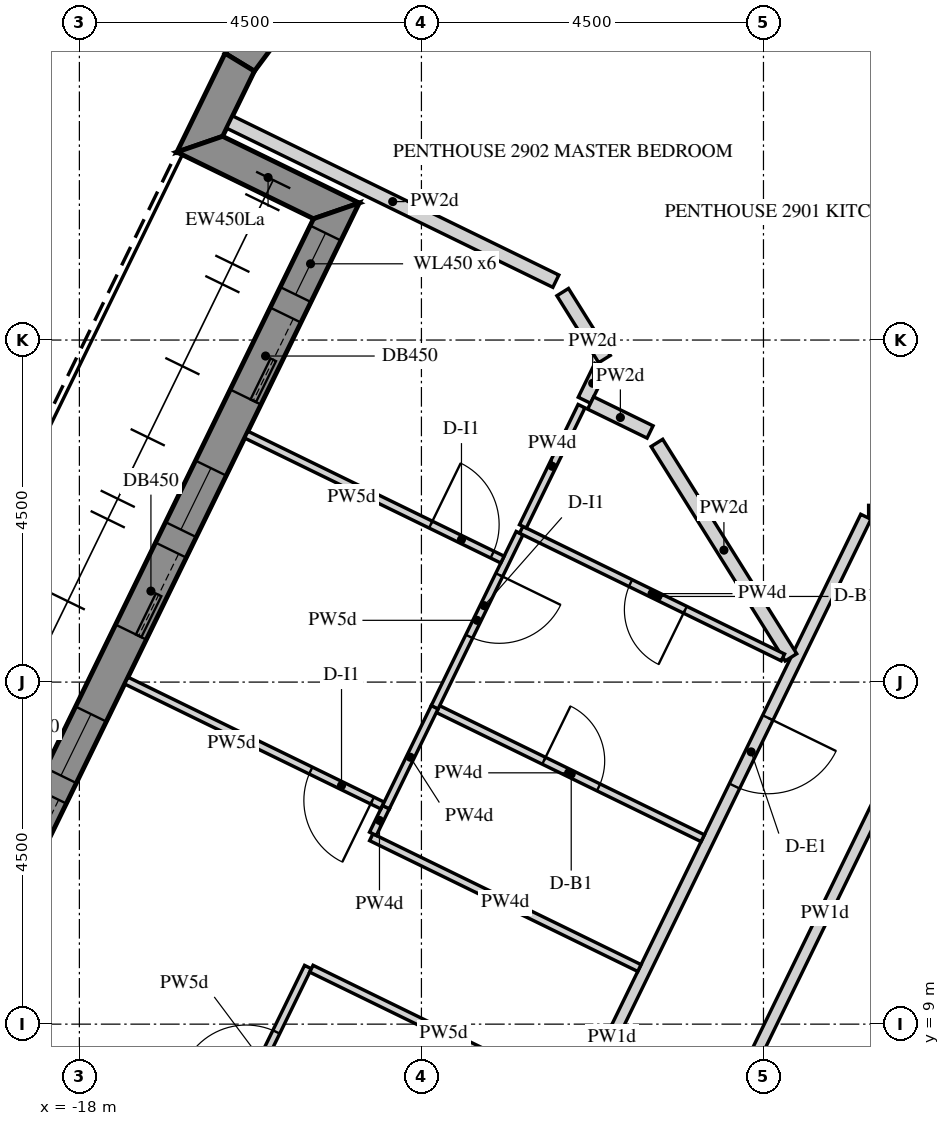
"""IFC4 building model, lengths in metres.
Left out: names, types, materials, properties, quantities, classifications, styles, units other than length and angle.
Written with IfcOpenShell. Run it as: python <this file> out.ifc"""

import sys

from ifc_helpers import new_model, si_unit, direction, frame, frame_2d, origin, place, context, subcontext, project, spatial, polyline, rectangle, outline, extrude, element, fill, save


model = new_model("IFC4")
c1 = context("Model", 3, precision=1e-05, world=origin(), true_north=direction((0.0, 1.0)))
c2 = subcontext(c1, "Body", "Model", "MODEL_VIEW")
j1 = project(units=[si_unit("LENGTHUNIT", "METRE"), si_unit("PLANEANGLEUNIT", "RADIAN")], contexts=[c1])
p1 = place(None, origin())
s1 = spatial("IfcSite", under=j1, at=p1, CompositionType="ELEMENT")
p2 = place(p1, origin())
s2 = spatial("IfcBuilding", under=s1, at=p2, CompositionType="ELEMENT")
p3 = place(p2, frame((0.0, 0.0, 372.9)))
s3 = spatial("IfcBuildingStorey", under=s2, at=p3, CompositionType="ELEMENT", Elevation=372.9)
p4 = place(p3, frame((-15.056, 22.776, -0.15), z_axis=(0.0, 0.0, 1.0), x_axis=(-0.597089203515, -0.802174845682, 0.0)))
e1 = element("IfcWall", 1, at=p4, inside=s3, PredefinedType="SOLIDWALL", context=c2, shape_type="SweptSolid", body=[
    extrude(outline(polyline([(-0.042, -0.225), (1.418, -0.225), (1.376, 0.225), (0.042, 0.225), (-0.042, -0.225)])), origin(), (0.0, 0.0, 1.0), 3.55),
])
p5 = place(p3, frame((-15.89, 21.655, -0.15), z_axis=(0.0, 0.0, 1.0), x_axis=(-0.438319390103, -0.898819287877, 0.0)))
e2 = element("IfcWall", 2, at=p5, inside=s3, PredefinedType="SOLIDWALL", context=c2, shape_type="SweptSolid", body=[
    extrude(outline(polyline([(-0.021, -0.225), (1.425, -0.225), (0.975, 0.225), (0.021, 0.225), (-0.021, -0.225)])), origin(), (0.0, 0.0, 1.0), 3.55),
])
p6 = place(p3, frame((-16.416, 20.576, -0.15), z_axis=(0.0, 0.0, 1.0), x_axis=(0.898730898244, -0.438500595829, 0.0)))
e3 = element("IfcWall", 3, at=p6, inside=s3, PredefinedType="SOLIDWALL", context=c2, shape_type="SweptSolid", body=[
    extrude(outline(polyline([(-0.225, -0.225), (1.775, -0.225), (2.225, 0.225), (0.225, 0.225), (-0.225, -0.225)])), origin(), (0.0, 0.0, 1.0), 3.55),
])
p7 = place(p3, frame((-14.619, 19.699, -0.15), z_axis=(0.0, 0.0, 1.0), x_axis=(-0.438373747484, -0.898792777851, 0.0)))
e4 = element("IfcWall", 4, at=p7, inside=s3, PredefinedType="SOLIDWALL", context=c2, shape_type="SweptSolid", body=[
    extrude(outline(polyline([(0.225, -0.225), (20.506, -0.225), (20.957, 0.225), (-0.225, 0.225), (0.225, -0.225)])), origin(), (0.0, 0.0, 1.0), 3.55),
])
p8 = place(p7, frame((0.325, 0.0, 1.05)))
e5 = element("IfcOpeningElement", 5, at=p8, cuts=e4, PredefinedType="OPENING", context=c2, shape_type="SweptSolid", body=[
    extrude(rectangle(XDim=0.9, YDim=1.5, at=frame_2d((0.45, 0.75))), frame((0.0, 0.235, 0.0), z_axis=(0.0, -1.0, 0.0), x_axis=(1.0, 0.0, 0.0)), (0.0, 0.0, 1.0), 0.47),
])
p9 = place(p7, frame((1.525, 0.0, 0.15)))
e6 = element("IfcOpeningElement", 6, at=p9, cuts=e4, PredefinedType="OPENING", context=c2, shape_type="SweptSolid", body=[
    extrude(rectangle(XDim=1.2, YDim=2.4, at=frame_2d((0.6, 1.2))), frame((0.0, 0.235, 0.0), z_axis=(0.0, -1.0, 0.0), x_axis=(1.0, 0.0, 0.0)), (0.0, 0.0, 1.0), 0.47),
])
p10 = place(p7, frame((3.766, 0.0, 1.05)))
e7 = element("IfcOpeningElement", 7, at=p10, cuts=e4, PredefinedType="OPENING", context=c2, shape_type="SweptSolid", body=[
    extrude(rectangle(XDim=0.9, YDim=1.5, at=frame_2d((0.45, 0.75))), frame((0.0, 0.235, 0.0), z_axis=(0.0, -1.0, 0.0), x_axis=(1.0, 0.0, 0.0)), (0.0, 0.0, 1.0), 0.47),
])
p11 = place(p7, frame((4.966, 0.0, 0.15)))
e8 = element("IfcOpeningElement", 8, at=p11, cuts=e4, PredefinedType="OPENING", context=c2, shape_type="SweptSolid", body=[
    extrude(rectangle(XDim=1.2, YDim=2.4, at=frame_2d((0.6, 1.2))), frame((0.0, 0.235, 0.0), z_axis=(0.0, -1.0, 0.0), x_axis=(1.0, 0.0, 0.0)), (0.0, 0.0, 1.0), 0.47),
])
p12 = place(p7, frame((7.366, 0.0, 1.05)))
e9 = element("IfcOpeningElement", 9, at=p12, cuts=e4, PredefinedType="OPENING", context=c2, shape_type="SweptSolid", body=[
    extrude(rectangle(XDim=0.9, YDim=1.5, at=frame_2d((0.45, 0.75))), frame((0.0, 0.235, 0.0), z_axis=(0.0, -1.0, 0.0), x_axis=(1.0, 0.0, 0.0)), (0.0, 0.0, 1.0), 0.47),
])
p13 = place(p7, frame((8.566, 0.0, 0.15)))
e10 = element("IfcOpeningElement", 10, at=p13, cuts=e4, PredefinedType="OPENING", context=c2, shape_type="SweptSolid", body=[
    extrude(rectangle(XDim=1.2, YDim=2.4, at=frame_2d((0.6, 1.2))), frame((0.0, 0.235, 0.0), z_axis=(0.0, -1.0, 0.0), x_axis=(1.0, 0.0, 0.0)), (0.0, 0.0, 1.0), 0.47),
])
p14 = place(p7, frame((10.966, 0.0, 1.05)))
e11 = element("IfcOpeningElement", 11, at=p14, cuts=e4, PredefinedType="OPENING", context=c2, shape_type="SweptSolid", body=[
    extrude(rectangle(XDim=0.9, YDim=1.5, at=frame_2d((0.45, 0.75))), frame((0.0, 0.235, 0.0), z_axis=(0.0, -1.0, 0.0), x_axis=(1.0, 0.0, 0.0)), (0.0, 0.0, 1.0), 0.47),
])
p15 = place(p7, frame((12.166, 0.0, 0.15)))
e12 = element("IfcOpeningElement", 12, at=p15, cuts=e4, PredefinedType="OPENING", context=c2, shape_type="SweptSolid", body=[
    extrude(rectangle(XDim=1.2, YDim=2.4, at=frame_2d((0.6, 1.2))), frame((0.0, 0.235, 0.0), z_axis=(0.0, -1.0, 0.0), x_axis=(1.0, 0.0, 0.0)), (0.0, 0.0, 1.0), 0.47),
])
p16 = place(p7, frame((14.566, 0.0, 1.05)))
e13 = element("IfcOpeningElement", 13, at=p16, cuts=e4, PredefinedType="OPENING", context=c2, shape_type="SweptSolid", body=[
    extrude(rectangle(XDim=0.9, YDim=1.5, at=frame_2d((0.45, 0.75))), frame((0.0, 0.235, 0.0), z_axis=(0.0, -1.0, 0.0), x_axis=(1.0, 0.0, 0.0)), (0.0, 0.0, 1.0), 0.47),
])
p17 = place(p7, frame((15.766, 0.0, 0.15)))
e14 = element("IfcOpeningElement", 14, at=p17, cuts=e4, PredefinedType="OPENING", context=c2, shape_type="SweptSolid", body=[
    extrude(rectangle(XDim=1.2, YDim=2.4, at=frame_2d((0.6, 1.2))), frame((0.0, 0.235, 0.0), z_axis=(0.0, -1.0, 0.0), x_axis=(1.0, 0.0, 0.0)), (0.0, 0.0, 1.0), 0.47),
])
p18 = place(p7, frame((18.007, 0.0, 1.05)))
e15 = element("IfcOpeningElement", 15, at=p18, cuts=e4, PredefinedType="OPENING", context=c2, shape_type="SweptSolid", body=[
    extrude(rectangle(XDim=0.9, YDim=1.5, at=frame_2d((0.45, 0.75))), frame((0.0, 0.235, 0.0), z_axis=(0.0, -1.0, 0.0), x_axis=(1.0, 0.0, 0.0)), (0.0, 0.0, 1.0), 0.47),
])
p19 = place(p7, frame((19.207, 0.0, 0.15)))
e16 = element("IfcOpeningElement", 16, at=p19, cuts=e4, PredefinedType="OPENING", context=c2, shape_type="SweptSolid", body=[
    extrude(rectangle(XDim=1.2, YDim=2.4, at=frame_2d((0.6, 1.2))), frame((0.0, 0.235, 0.0), z_axis=(0.0, -1.0, 0.0), x_axis=(1.0, 0.0, 0.0)), (0.0, 0.0, 1.0), 0.47),
])
p20 = place(p3, frame((-5.673, 9.825, -0.15), z_axis=(0.0, 0.0, 1.0), x_axis=(-0.499995046907, -0.866028263435, 0.0)))
e17 = element("IfcWall", 17, at=p20, inside=s3, PredefinedType="SHEAR", context=c2, shape_type="SweptSolid", body=[
    extrude(outline(polyline([(-0.101, -0.175), (11.446, -0.175), (11.244, 0.175), (0.101, 0.175), (-0.101, -0.175)])), origin(), (0.0, 0.0, 1.0), 3.55),
])
p21 = place(p20, frame((4.801, 0.0, 0.15)))
e18 = element("IfcOpeningElement", 18, at=p21, cuts=e17, PredefinedType="OPENING", context=c2, shape_type="SweptSolid", body=[
    extrude(rectangle(XDim=1.8, YDim=2.4, at=frame_2d((0.9, 1.2))), frame((0.0, 0.185, 0.0), z_axis=(0.0, -1.0, 0.0), x_axis=(1.0, 0.0, 0.0)), (0.0, 0.0, 1.0), 0.37),
])
p22 = place(p3, frame((5.887, 15.75, 0.0), z_axis=(0.0, 0.0, 1.0), x_axis=(-1.0, 0.0, 0.0)))
e19 = element("IfcWall", 19, at=p22, inside=s3, PredefinedType="PARTITIONING", context=c2, shape_type="SweptSolid", body=[
    extrude(rectangle(XDim=13.503, YDim=0.15, at=frame_2d((6.752, 0.0))), origin(), (0.0, 0.0, 1.0), 2.47),
])
p23 = place(p22, frame((3.825, 0.0, 0.0)))
e20 = element("IfcOpeningElement", 20, at=p23, cuts=e19, PredefinedType="OPENING", context=c2, shape_type="SweptSolid", body=[
    extrude(rectangle(XDim=1.0, YDim=2.1, at=frame_2d((0.5, 1.05))), frame((0.0, 0.085, 0.0), z_axis=(0.0, -1.0, 0.0), x_axis=(1.0, 0.0, 0.0)), (0.0, 0.0, 1.0), 0.17),
])
p24 = place(p3, frame((-7.653, 15.675, 0.0), z_axis=(0.0, 0.0, 1.0), x_axis=(-0.438369669055, -0.898794767037, 0.0)))
e21 = element("IfcWall", 21, at=p24, inside=s3, PredefinedType="PARTITIONING", context=c2, shape_type="SweptSolid", body=[
    extrude(rectangle(XDim=15.243, YDim=0.15, at=frame_2d((7.621, 0.0))), origin(), (0.0, 0.0, 1.0), 2.47),
])
p25 = place(p24, frame((2.942, 0.0, 0.0)))
e22 = element("IfcOpeningElement", 22, at=p25, cuts=e21, PredefinedType="OPENING", context=c2, shape_type="SweptSolid", body=[
    extrude(rectangle(XDim=1.0, YDim=2.1, at=frame_2d((0.5, 1.05))), frame((0.0, 0.085, 0.0), z_axis=(0.0, -1.0, 0.0), x_axis=(1.0, 0.0, 0.0)), (0.0, 0.0, 1.0), 0.17),
])
p26 = place(p3, frame((-9.893, 6.977, 0.0), z_axis=(0.0, 0.0, 1.0), x_axis=(0.438380229518, 0.898789616299, 0.0)))
e23 = element("IfcWall", 23, at=p26, inside=s3, PredefinedType="PARTITIONING", context=c2, shape_type="SweptSolid", body=[
    extrude(rectangle(XDim=7.758, YDim=0.15, at=frame_2d((3.879, 0.0))), origin(), (0.0, 0.0, 1.0), 2.47),
])
p27 = place(p3, frame((-16.024, 20.868, 0.0), z_axis=(0.0, 0.0, 1.0), x_axis=(0.898790554329, -0.438378306317, 0.0)))
e24 = element("IfcWall", 24, at=p27, inside=s3, PredefinedType="PARTITIONING", context=c2, shape_type="SweptSolid", body=[
    extrude(rectangle(XDim=4.776, YDim=0.18, at=frame_2d((2.388, 0.0))), origin(), (0.0, 0.0, 1.0), 2.47),
])
p28 = place(p3, frame((-11.642, 18.63, 0.0), z_axis=(0.0, 0.0, 1.0), x_axis=(0.530041214548, -0.847971880949, 0.0)))
e25 = element("IfcWall", 25, at=p28, inside=s3, PredefinedType="PARTITIONING", context=c2, shape_type="SweptSolid", body=[
    extrude(rectangle(XDim=1.038, YDim=0.18, at=frame_2d((0.519, 0.0))), origin(), (0.0, 0.0, 1.0), 2.47),
])
p29 = place(p3, frame((-11.138, 17.655, 0.0), z_axis=(0.0, 0.0, 1.0), x_axis=(-0.43834617456, -0.89880622564, 0.0)))
e26 = element("IfcWall", 26, at=p29, inside=s3, PredefinedType="PARTITIONING", context=c2, shape_type="SweptSolid", body=[
    extrude(rectangle(XDim=0.497, YDim=0.18, at=frame_2d((0.249, 0.0))), origin(), (0.0, 0.0, 1.0), 2.47),
])
p30 = place(p3, frame((-11.273, 17.172, 0.0), z_axis=(0.0, 0.0, 1.0), x_axis=(0.898819713643, -0.438318517025, 0.0)))
e27 = element("IfcWall", 27, at=p30, inside=s3, PredefinedType="PARTITIONING", context=c2, shape_type="SweptSolid", body=[
    extrude(rectangle(XDim=0.869, YDim=0.18, at=frame_2d((0.435, 0.0))), origin(), (0.0, 0.0, 1.0), 2.47),
])
p31 = place(p3, frame((-10.402, 16.647, 0.0), z_axis=(0.0, 0.0, 1.0), x_axis=(0.529853827573, -0.84808898201, 0.0)))
e28 = element("IfcWall", 28, at=p31, inside=s3, PredefinedType="PARTITIONING", context=c2, shape_type="SweptSolid", body=[
    extrude(rectangle(XDim=3.327, YDim=0.18, at=frame_2d((1.664, 0.0))), origin(), (0.0, 0.0, 1.0), 2.47),
])
p32 = place(p3, frame((-10.632, 9.738, 0.0), z_axis=(0.0, 0.0, 1.0), x_axis=(-0.898787574002, 0.438384416717, 0.0)))
e29 = element("IfcWall", 29, at=p32, inside=s3, PredefinedType="PARTITIONING", context=c2, shape_type="SweptSolid", body=[
    extrude(rectangle(XDim=3.925, YDim=0.1, at=frame_2d((1.962, 0.0))), origin(), (0.0, 0.0, 1.0), 2.47),
])
p33 = place(p3, frame((-14.138, 11.504, 0.0), z_axis=(0.0, 0.0, 1.0), x_axis=(0.438214838481, 0.898870266131, 0.0)))
e30 = element("IfcWall", 30, at=p33, inside=s3, PredefinedType="PARTITIONING", context=c2, shape_type="SweptSolid", body=[
    extrude(rectangle(XDim=0.392, YDim=0.1, at=frame_2d((0.196, 0.0))), origin(), (0.0, 0.0, 1.0), 2.47),
])
p34 = place(p3, frame((-14.012, 11.876, 0.0), z_axis=(0.0, 0.0, 1.0), x_axis=(-0.898810362659, 0.438337691713, 0.0)))
e31 = element("IfcWall", 31, at=p34, inside=s3, PredefinedType="PARTITIONING", context=c2, shape_type="SweptSolid", body=[
    extrude(rectangle(XDim=3.75, YDim=0.1, at=frame_2d((1.875, 0.0))), origin(), (0.0, 0.0, 1.0), 2.47),
])
p35 = place(p34, frame((0.15, 0.0, 0.0)))
e32 = element("IfcOpeningElement", 32, at=p35, cuts=e31, PredefinedType="OPENING", context=c2, shape_type="SweptSolid", body=[
    extrude(rectangle(XDim=0.9, YDim=2.1, at=frame_2d((0.45, 1.05))), frame((0.0, 0.06, 0.0), z_axis=(0.0, -1.0, 0.0), x_axis=(1.0, 0.0, 0.0)), (0.0, 0.0, 1.0), 0.12),
])
p36 = place(p3, frame((-16.198, 7.28, 0.0), z_axis=(0.0, 0.0, 1.0), x_axis=(0.438385151252, 0.898787215731, 0.0)))
e33 = element("IfcWall", 33, at=p36, inside=s3, PredefinedType="PARTITIONING", context=c2, shape_type="SweptSolid", body=[
    extrude(rectangle(XDim=2.75, YDim=0.1, at=frame_2d((1.375, 0.0))), origin(), (0.0, 0.0, 1.0), 2.47),
])
p37 = place(p36, frame((0.9, 0.0, 0.0)))
e34 = element("IfcOpeningElement", 34, at=p37, cuts=e33, PredefinedType="OPENING", context=c2, shape_type="SweptSolid", body=[
    extrude(rectangle(XDim=0.9, YDim=2.1, at=frame_2d((0.45, 1.05))), frame((0.0, 0.06, 0.0), z_axis=(0.0, -1.0, 0.0), x_axis=(1.0, 0.0, 0.0)), (0.0, 0.0, 1.0), 0.12),
])
p38 = place(p3, frame((-14.948, 9.729, 0.0), z_axis=(0.0, 0.0, 1.0), x_axis=(0.898793875229, -0.438371497535, 0.0)))
e35 = element("IfcWall", 35, at=p38, inside=s3, PredefinedType="PARTITIONING", context=c2, shape_type="SweptSolid", body=[
    extrude(rectangle(XDim=3.875, YDim=0.1, at=frame_2d((1.938, 0.0))), origin(), (0.0, 0.0, 1.0), 2.47),
])
p39 = place(p3, frame((-13.327, 13.167, 0.0), z_axis=(0.0, 0.0, 1.0), x_axis=(0.898812080899, -0.438334168449, 0.0)))
e36 = element("IfcWall", 36, at=p39, inside=s3, PredefinedType="PARTITIONING", context=c2, shape_type="SweptSolid", body=[
    extrude(rectangle(XDim=3.925, YDim=0.1, at=frame_2d((1.962, 0.0))), origin(), (0.0, 0.0, 1.0), 2.47),
])
p40 = place(p39, frame((1.6, 0.0, 0.0)))
e37 = element("IfcOpeningElement", 37, at=p40, cuts=e36, PredefinedType="OPENING", context=c2, shape_type="SweptSolid", body=[
    extrude(rectangle(XDim=0.8, YDim=2.1, at=frame_2d((0.4, 1.05))), frame((0.0, 0.06, 0.0), z_axis=(0.0, -1.0, 0.0), x_axis=(1.0, 0.0, 0.0)), (0.0, 0.0, 1.0), 0.12),
])
p41 = place(p3, frame((-12.208, 15.46, 0.0), z_axis=(0.0, 0.0, 1.0), x_axis=(-0.438359600369, -0.898799677773, 0.0)))
e38 = element("IfcWall", 38, at=p41, inside=s3, PredefinedType="PARTITIONING", context=c2, shape_type="SweptSolid", body=[
    extrude(rectangle(XDim=2.554, YDim=0.1, at=frame_2d((1.277, 0.0))), origin(), (0.0, 0.0, 1.0), 2.47),
])
p42 = place(p41, frame((0.612, 0.0, 0.0)))
e39 = element("IfcOpeningElement", 39, at=p42, cuts=e38, PredefinedType="OPENING", context=c2, shape_type="SweptSolid", body=[
    extrude(rectangle(XDim=0.9, YDim=2.1, at=frame_2d((0.45, 1.05))), frame((0.0, 0.06, 0.0), z_axis=(0.0, -1.0, 0.0), x_axis=(1.0, 0.0, 0.0)), (0.0, 0.0, 1.0), 0.12),
])
p43 = place(p3, frame((-8.745, 13.824, 0.0), z_axis=(0.0, 0.0, 1.0), x_axis=(-0.898794787177, 0.43836962776, 0.0)))
e40 = element("IfcWall", 40, at=p43, inside=s3, PredefinedType="PARTITIONING", context=c2, shape_type="SweptSolid", body=[
    extrude(rectangle(XDim=3.83, YDim=0.1, at=frame_2d((1.915, 0.0))), origin(), (0.0, 0.0, 1.0), 2.47),
])
p44 = place(p43, frame((1.43, 0.0, 0.0)))
e41 = element("IfcOpeningElement", 41, at=p44, cuts=e40, PredefinedType="OPENING", context=c2, shape_type="SweptSolid", body=[
    extrude(rectangle(XDim=0.8, YDim=2.1, at=frame_2d((0.4, 1.05))), frame((0.0, 0.06, 0.0), z_axis=(0.0, -1.0, 0.0), x_axis=(1.0, 0.0, 0.0)), (0.0, 0.0, 1.0), 0.12),
])
p45 = place(p3, frame((-13.326, 13.168, 0.0), z_axis=(0.0, 0.0, 1.0), x_axis=(-0.438377585285, -0.898790906006, 0.0)))
e42 = element("IfcWall", 42, at=p45, inside=s3, PredefinedType="PARTITIONING", context=c2, shape_type="SweptSolid", body=[
    extrude(rectangle(XDim=1.462, YDim=0.1, at=frame_2d((0.731, 0.0))), origin(), (0.0, 0.0, 1.0), 2.47),
])
p46 = place(p3, frame((-15.804, 16.756, 0.0), z_axis=(0.0, 0.0, 1.0), x_axis=(0.89878471246, -0.438390283479, 0.0)))
e43 = element("IfcWall", 43, at=p46, inside=s3, PredefinedType="PARTITIONING", context=c2, shape_type="SweptSolid", body=[
    extrude(rectangle(XDim=3.75, YDim=0.1, at=frame_2d((1.875, 0.0))), origin(), (0.0, 0.0, 1.0), 2.47),
])
p47 = place(p46, frame((2.7, 0.0, 0.0)))
e44 = element("IfcOpeningElement", 44, at=p47, cuts=e43, PredefinedType="OPENING", context=c2, shape_type="SweptSolid", body=[
    extrude(rectangle(XDim=0.9, YDim=2.1, at=frame_2d((0.45, 1.05))), frame((0.0, 0.06, 0.0), z_axis=(0.0, -1.0, 0.0), x_axis=(1.0, 0.0, 0.0)), (0.0, 0.0, 1.0), 0.12),
])
p48 = place(p3, frame((-12.165, 15.548, 0.0), z_axis=(0.0, 0.0, 1.0), x_axis=(0.438426364669, 0.89876711264, 0.0)))
e45 = element("IfcWall", 45, at=p48, inside=s3, PredefinedType="PARTITIONING", context=c2, shape_type="SweptSolid", body=[
    extrude(rectangle(XDim=1.76, YDim=0.1, at=frame_2d((0.88, 0.0))), origin(), (0.0, 0.0, 1.0), 2.47),
])
p49 = place(p8, frame((0.0, 0.155, 0.0)))
e46 = element("IfcWindow", 46, at=p49, inside=s3, PartitioningType="SINGLE_PANEL", PredefinedType="WINDOW", context=c2, shape_type="SweptSolid", body=[
    extrude(rectangle(XDim=0.9, YDim=1.5, at=frame_2d((0.45, 0.75))), frame((0.0, 0.03, 0.0), z_axis=(0.0, -1.0, 0.0), x_axis=(1.0, 0.0, 0.0)), (0.0, 0.0, 1.0), 0.06),
])
fill(e5, e46)
p50 = place(p9, frame((0.0, 0.15, 0.0)))
e47 = element("IfcDoor", 47, at=p50, inside=s3, OperationType="SLIDING_TO_LEFT", PredefinedType="DOOR", context=c2, shape_type="SweptSolid", body=[
    extrude(rectangle(XDim=1.2, YDim=2.4, at=frame_2d((0.6, 1.2))), frame((0.0, 0.025, 0.0), z_axis=(0.0, -1.0, 0.0), x_axis=(1.0, 0.0, 0.0)), (0.0, 0.0, 1.0), 0.05),
])
fill(e6, e47)
p51 = place(p10, frame((0.0, 0.155, 0.0)))
e48 = element("IfcWindow", 48, at=p51, inside=s3, PartitioningType="SINGLE_PANEL", PredefinedType="WINDOW", context=c2, shape_type="SweptSolid", body=[
    extrude(rectangle(XDim=0.9, YDim=1.5, at=frame_2d((0.45, 0.75))), frame((0.0, 0.03, 0.0), z_axis=(0.0, -1.0, 0.0), x_axis=(1.0, 0.0, 0.0)), (0.0, 0.0, 1.0), 0.06),
])
fill(e7, e48)
p52 = place(p11, frame((0.0, 0.15, 0.0)))
e49 = element("IfcDoor", 49, at=p52, inside=s3, OperationType="SLIDING_TO_LEFT", PredefinedType="DOOR", context=c2, shape_type="SweptSolid", body=[
    extrude(rectangle(XDim=1.2, YDim=2.4, at=frame_2d((0.6, 1.2))), frame((0.0, 0.025, 0.0), z_axis=(0.0, -1.0, 0.0), x_axis=(1.0, 0.0, 0.0)), (0.0, 0.0, 1.0), 0.05),
])
fill(e8, e49)
p53 = place(p12, frame((0.0, 0.155, 0.0)))
e50 = element("IfcWindow", 50, at=p53, inside=s3, PartitioningType="SINGLE_PANEL", PredefinedType="WINDOW", context=c2, shape_type="SweptSolid", body=[
    extrude(rectangle(XDim=0.9, YDim=1.5, at=frame_2d((0.45, 0.75))), frame((0.0, 0.03, 0.0), z_axis=(0.0, -1.0, 0.0), x_axis=(1.0, 0.0, 0.0)), (0.0, 0.0, 1.0), 0.06),
])
fill(e9, e50)
p54 = place(p13, frame((0.0, 0.15, 0.0)))
e51 = element("IfcDoor", 51, at=p54, inside=s3, OperationType="SLIDING_TO_LEFT", PredefinedType="DOOR", context=c2, shape_type="SweptSolid", body=[
    extrude(rectangle(XDim=1.2, YDim=2.4, at=frame_2d((0.6, 1.2))), frame((0.0, 0.025, 0.0), z_axis=(0.0, -1.0, 0.0), x_axis=(1.0, 0.0, 0.0)), (0.0, 0.0, 1.0), 0.05),
])
fill(e10, e51)
p55 = place(p25, origin())
e52 = element("IfcDoor", 52, at=p55, inside=s3, OperationType="SINGLE_SWING_RIGHT", PredefinedType="DOOR", context=c2, shape_type="SweptSolid", body=[
    extrude(rectangle(XDim=1.0, YDim=2.1, at=frame_2d((0.5, 1.05))), frame((0.0, 0.025, 0.0), z_axis=(0.0, -1.0, 0.0), x_axis=(1.0, 0.0, 0.0)), (0.0, 0.0, 1.0), 0.05),
])
fill(e22, e52)
p56 = place(p40, origin())
e53 = element("IfcDoor", 53, at=p56, inside=s3, OperationType="SINGLE_SWING_LEFT", PredefinedType="DOOR", context=c2, shape_type="SweptSolid", body=[
    extrude(rectangle(XDim=0.8, YDim=2.1, at=frame_2d((0.4, 1.05))), frame((0.0, 0.025, 0.0), z_axis=(0.0, -1.0, 0.0), x_axis=(1.0, 0.0, 0.0)), (0.0, 0.0, 1.0), 0.05),
])
fill(e37, e53)
p57 = place(p42, origin())
e54 = element("IfcDoor", 54, at=p57, inside=s3, OperationType="SINGLE_SWING_LEFT", PredefinedType="DOOR", context=c2, shape_type="SweptSolid", body=[
    extrude(rectangle(XDim=0.9, YDim=2.1, at=frame_2d((0.45, 1.05))), frame((0.0, 0.025, 0.0), z_axis=(0.0, -1.0, 0.0), x_axis=(1.0, 0.0, 0.0)), (0.0, 0.0, 1.0), 0.05),
])
fill(e39, e54)
p58 = place(p47, origin())
e55 = element("IfcDoor", 55, at=p58, inside=s3, OperationType="SINGLE_SWING_RIGHT", PredefinedType="DOOR", context=c2, shape_type="SweptSolid", body=[
    extrude(rectangle(XDim=0.9, YDim=2.1, at=frame_2d((0.45, 1.05))), frame((0.0, 0.025, 0.0), z_axis=(0.0, -1.0, 0.0), x_axis=(1.0, 0.0, 0.0)), (0.0, 0.0, 1.0), 0.05),
])
fill(e44, e55)
p59 = place(p35, origin())
e56 = element("IfcDoor", 56, at=p59, inside=s3, OperationType="SINGLE_SWING_RIGHT", PredefinedType="DOOR", context=c2, shape_type="SweptSolid", body=[
    extrude(rectangle(XDim=0.9, YDim=2.1, at=frame_2d((0.45, 1.05))), frame((0.0, 0.025, 0.0), z_axis=(0.0, -1.0, 0.0), x_axis=(1.0, 0.0, 0.0)), (0.0, 0.0, 1.0), 0.05),
])
fill(e32, e56)
p60 = place(p44, origin())
e57 = element("IfcDoor", 57, at=p60, inside=s3, OperationType="SINGLE_SWING_RIGHT", PredefinedType="DOOR", context=c2, shape_type="SweptSolid", body=[
    extrude(rectangle(XDim=0.8, YDim=2.1, at=frame_2d((0.4, 1.05))), frame((0.0, 0.025, 0.0), z_axis=(0.0, -1.0, 0.0), x_axis=(1.0, 0.0, 0.0)), (0.0, 0.0, 1.0), 0.05),
])
fill(e41, e57)
p61 = place(p37, origin())
e58 = element("IfcDoor", 58, at=p61, inside=s3, OperationType="SINGLE_SWING_LEFT", PredefinedType="DOOR", context=c2, shape_type="SweptSolid", body=[
    extrude(rectangle(XDim=0.9, YDim=2.1, at=frame_2d((0.45, 1.05))), frame((0.0, 0.025, 0.0), z_axis=(0.0, -1.0, 0.0), x_axis=(1.0, 0.0, 0.0)), (0.0, 0.0, 1.0), 0.05),
])
fill(e34, e58)
save(model, sys.argv[1])
